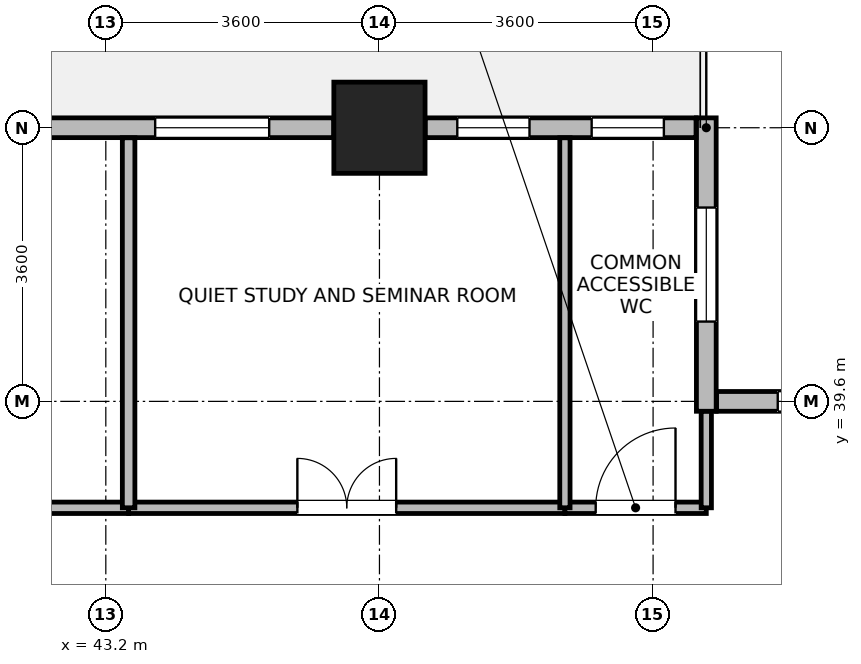
"""IFC4 building model, lengths in metres.
Left out: names, types, materials, properties, quantities, classifications, styles, units other than length and angle.
Written with IfcOpenShell. Run it as: python <this file> out.ifc"""

import sys

from ifc_helpers import new_model, si_unit, direction, frame, frame_2d, origin, origin_2d, place, context, subcontext, project, spatial, rectangle, extrude, source, transform, mapped, element, fill, save


model = new_model("IFC4")
c1 = context("Model", 3, precision=1e-05, world=origin(), true_north=direction((0.0, 1.0)))
c2 = subcontext(c1, "Body", "Model", "MODEL_VIEW")
j1 = project(units=[si_unit("LENGTHUNIT", "METRE"), si_unit("PLANEANGLEUNIT", "RADIAN")], contexts=[c1])
p1 = place(None, origin())
s1 = spatial("IfcSite", under=j1, at=p1, CompositionType="ELEMENT")
p2 = place(p1, origin())
s2 = spatial("IfcBuilding", under=s1, at=p2, CompositionType="ELEMENT")
p3 = place(p2, frame((0.0, 0.0, 108.2)))
s3 = spatial("IfcBuildingStorey", under=s2, at=p3, CompositionType="ELEMENT", Elevation=108.2)
m1 = source(origin(), c2, "Body", "SweptSolid", [
    extrude(rectangle(XDim=1.2, YDim=1.2, at=origin_2d()), origin(), (0.0, 0.0, 1.0), 3.7),
])
p4 = place(p3, frame((46.8, 43.2, 0.0), z_axis=(0.0, 0.0, 1.0), x_axis=(1.0, 0.0, 0.0)))
e1 = element("IfcColumn", 1, at=p4, inside=s3, PredefinedType="COLUMN", context=c2, shape_type="MappedRepresentation", body=[
    mapped(m1, transform((0.0, 0.0, 0.0), x_axis=(1.0, 0.0, 0.0), y_axis=(0.0, 1.0, 0.0), z_axis=(0.0, 0.0, 1.0), scale=1.0)),
])
p5 = place(p3, frame((51.235, 39.6, 0.0), z_axis=(0.0, 0.0, 1.0), x_axis=(1.0, 0.0, 0.0)))
e2 = element("IfcWall", 2, at=p5, inside=s3, PredefinedType="STANDARD", context=c2, shape_type="SweptSolid", body=[
    extrude(rectangle(XDim=9.33, YDim=0.26, at=frame_2d((4.665, 0.0))), origin(), (0.0, 0.0, 1.0), 3.43),
])
p6 = place(p5, frame((0.805, 0.0, 0.85)))
e3 = element("IfcOpeningElement", 3, at=p6, cuts=e2, PredefinedType="OPENING", context=c2, shape_type="SweptSolid", body=[
    extrude(rectangle(XDim=1.5, YDim=1.85, at=frame_2d((0.75, 0.925))), frame((0.0, 0.14, 0.0), z_axis=(0.0, -1.0, 0.0), x_axis=(1.0, 0.0, 0.0)), (0.0, 0.0, 1.0), 0.28),
])
p7 = place(p5, frame((3.915, 0.0, 0.85)))
e4 = element("IfcOpeningElement", 4, at=p7, cuts=e2, PredefinedType="OPENING", context=c2, shape_type="SweptSolid", body=[
    extrude(rectangle(XDim=1.5, YDim=1.85, at=frame_2d((0.75, 0.925))), frame((0.0, 0.14, 0.0), z_axis=(0.0, -1.0, 0.0), x_axis=(1.0, 0.0, 0.0)), (0.0, 0.0, 1.0), 0.28),
])
p8 = place(p5, frame((7.025, 0.0, 0.85)))
e5 = element("IfcOpeningElement", 5, at=p8, cuts=e2, PredefinedType="OPENING", context=c2, shape_type="SweptSolid", body=[
    extrude(rectangle(XDim=1.5, YDim=1.85, at=frame_2d((0.75, 0.925))), frame((0.0, 0.14, 0.0), z_axis=(0.0, -1.0, 0.0), x_axis=(1.0, 0.0, 0.0)), (0.0, 0.0, 1.0), 0.28),
])
p9 = place(p3, frame((51.1, 43.33, 0.0), z_axis=(0.0, 0.0, 1.0), x_axis=(0.0, -1.0, 0.0)))
e6 = element("IfcWall", 6, at=p9, inside=s3, PredefinedType="STANDARD", context=c2, shape_type="SweptSolid", body=[
    extrude(rectangle(XDim=3.86, YDim=0.26, at=frame_2d((1.93, 0.0))), origin(), (0.0, 0.0, 1.0), 3.43),
])
p10 = place(p9, frame((1.18, 0.0, 0.85)))
e7 = element("IfcOpeningElement", 7, at=p10, cuts=e6, PredefinedType="OPENING", context=c2, shape_type="SweptSolid", body=[
    extrude(rectangle(XDim=1.5, YDim=1.85, at=frame_2d((0.75, 0.925))), frame((0.0, 0.14, 0.0), z_axis=(0.0, -1.0, 0.0), x_axis=(1.0, 0.0, 0.0)), (0.0, 0.0, 1.0), 0.28),
])
p11 = place(p3, frame((47.401, 43.2, 0.0), z_axis=(0.0, 0.0, 1.0), x_axis=(1.0, 0.0, 0.0)))
e8 = element("IfcWall", 8, at=p11, inside=s3, PredefinedType="STANDARD", context=c2, shape_type="SweptSolid", body=[
    extrude(rectangle(XDim=3.564, YDim=0.26, at=frame_2d((1.782, 0.0))), origin(), (0.0, 0.0, 1.0), 3.43),
])
p12 = place(p11, frame((0.423, 0.0, 0.85)))
e9 = element("IfcOpeningElement", 9, at=p12, cuts=e8, PredefinedType="OPENING", context=c2, shape_type="SweptSolid", body=[
    extrude(rectangle(XDim=0.95, YDim=1.75, at=frame_2d((0.475, 0.875))), frame((0.0, 0.14, 0.0), z_axis=(0.0, -1.0, 0.0), x_axis=(1.0, 0.0, 0.0)), (0.0, 0.0, 1.0), 0.28),
])
p13 = place(p11, frame((2.191, 0.0, 0.85)))
e10 = element("IfcOpeningElement", 10, at=p13, cuts=e8, PredefinedType="OPENING", context=c2, shape_type="SweptSolid", body=[
    extrude(rectangle(XDim=0.95, YDim=1.75, at=frame_2d((0.475, 0.875))), frame((0.0, 0.14, 0.0), z_axis=(0.0, -1.0, 0.0), x_axis=(1.0, 0.0, 0.0)), (0.0, 0.0, 1.0), 0.28),
])
p14 = place(p3, frame((36.601, 43.2, 0.0), z_axis=(0.0, 0.0, 1.0), x_axis=(1.0, 0.0, 0.0)))
e11 = element("IfcWall", 11, at=p14, inside=s3, PredefinedType="STANDARD", context=c2, shape_type="SweptSolid", body=[
    extrude(rectangle(XDim=9.598, YDim=0.26, at=frame_2d((4.799, 0.0))), origin(), (0.0, 0.0, 1.0), 2.98),
])
p15 = place(p14, frame((4.049, 0.0, 0.0)))
e12 = element("IfcOpeningElement", 12, at=p15, cuts=e11, PredefinedType="OPENING", context=c2, shape_type="SweptSolid", body=[
    extrude(rectangle(XDim=1.5, YDim=2.15, at=frame_2d((0.75, 1.075))), frame((0.0, 0.14, 0.0), z_axis=(0.0, -1.0, 0.0), x_axis=(1.0, 0.0, 0.0)), (0.0, 0.0, 1.0), 0.28),
])
p16 = place(p14, frame((0.85, 0.0, 0.85)))
e13 = element("IfcOpeningElement", 13, at=p16, cuts=e11, PredefinedType="OPENING", context=c2, shape_type="SweptSolid", body=[
    extrude(rectangle(XDim=1.5, YDim=1.85, at=frame_2d((0.75, 0.925))), frame((0.0, 0.14, 0.0), z_axis=(0.0, -1.0, 0.0), x_axis=(1.0, 0.0, 0.0)), (0.0, 0.0, 1.0), 0.28),
])
p17 = place(p14, frame((7.248, 0.0, 0.85)))
e14 = element("IfcOpeningElement", 14, at=p17, cuts=e11, PredefinedType="OPENING", context=c2, shape_type="SweptSolid", body=[
    extrude(rectangle(XDim=1.5, YDim=1.85, at=frame_2d((0.75, 0.925))), frame((0.0, 0.14, 0.0), z_axis=(0.0, -1.0, 0.0), x_axis=(1.0, 0.0, 0.0)), (0.0, 0.0, 1.0), 0.28),
])
p18 = place(p3, frame((34.8, 38.2, 0.0), z_axis=(0.0, 0.0, 1.0), x_axis=(1.0, 0.0, 0.0)))
e15 = element("IfcWall", 15, at=p18, inside=s3, PredefinedType="PARTITIONING", context=c2, shape_type="SweptSolid", body=[
    extrude(rectangle(XDim=8.7, YDim=0.15, at=frame_2d((4.35, 0.0))), origin(), (0.0, 0.0, 1.0), 3.43),
])
p19 = place(p18, frame((3.9, 0.0, 0.0)))
e16 = element("IfcOpeningElement", 16, at=p19, cuts=e15, PredefinedType="OPENING", context=c2, shape_type="SweptSolid", body=[
    extrude(rectangle(XDim=0.9, YDim=2.08, at=frame_2d((0.45, 1.04))), frame((0.0, 0.085, 0.0), z_axis=(0.0, -1.0, 0.0), x_axis=(1.0, 0.0, 0.0)), (0.0, 0.0, 1.0), 0.17),
])
p20 = place(p3, frame((43.5, 38.2, 0.0), z_axis=(0.0, 0.0, 1.0), x_axis=(1.0, 0.0, 0.0)))
e17 = element("IfcWall", 17, at=p20, inside=s3, PredefinedType="PARTITIONING", context=c2, shape_type="SweptSolid", body=[
    extrude(rectangle(XDim=5.74, YDim=0.15, at=frame_2d((2.87, 0.0))), origin(), (0.0, 0.0, 1.0), 3.43),
])
p21 = place(p20, frame((2.22, 0.0, 0.0)))
e18 = element("IfcOpeningElement", 18, at=p21, cuts=e17, PredefinedType="OPENING", context=c2, shape_type="SweptSolid", body=[
    extrude(rectangle(XDim=1.3, YDim=2.12, at=frame_2d((0.65, 1.06))), frame((0.0, 0.085, 0.0), z_axis=(0.0, -1.0, 0.0), x_axis=(1.0, 0.0, 0.0)), (0.0, 0.0, 1.0), 0.17),
])
p22 = place(p3, frame((49.24, 38.2, 0.0), z_axis=(0.0, 0.0, 1.0), x_axis=(1.0, 0.0, 0.0)))
e19 = element("IfcWall", 19, at=p22, inside=s3, PredefinedType="PARTITIONING", context=c2, shape_type="SweptSolid", body=[
    extrude(rectangle(XDim=1.86, YDim=0.15, at=frame_2d((0.93, 0.0))), origin(), (0.0, 0.0, 1.0), 3.43),
])
p23 = place(p22, frame((0.405, 0.0, 0.0)))
e20 = element("IfcOpeningElement", 20, at=p23, cuts=e19, PredefinedType="OPENING", context=c2, shape_type="SweptSolid", body=[
    extrude(rectangle(XDim=1.05, YDim=2.12, at=frame_2d((0.525, 1.06))), frame((0.0, 0.085, 0.0), z_axis=(0.0, -1.0, 0.0), x_axis=(1.0, 0.0, 0.0)), (0.0, 0.0, 1.0), 0.17),
])
p24 = place(p3, frame((43.5, 38.2, 0.0), z_axis=(0.0, 0.0, 1.0), x_axis=(0.0, 1.0, 0.0)))
e21 = element("IfcWall", 21, at=p24, inside=s3, PredefinedType="PARTITIONING", context=c2, shape_type="SweptSolid", body=[
    extrude(rectangle(XDim=4.868, YDim=0.165, at=frame_2d((2.434, 0.0))), origin(), (0.0, 0.0, 1.0), 3.43),
])
p25 = place(p3, frame((49.24, 38.2, 0.0), z_axis=(0.0, 0.0, 1.0), x_axis=(0.0, 1.0, 0.0)))
e22 = element("IfcWall", 22, at=p25, inside=s3, PredefinedType="PARTITIONING", context=c2, shape_type="SweptSolid", body=[
    extrude(rectangle(XDim=4.868, YDim=0.135, at=frame_2d((2.434, 0.0))), origin(), (0.0, 0.0, 1.0), 3.43),
])
p26 = place(p3, frame((51.1, 38.2, 0.0), z_axis=(0.0, 0.0, 1.0), x_axis=(0.0, 1.0, 0.0)))
e23 = element("IfcWall", 23, at=p26, inside=s3, PredefinedType="PARTITIONING", context=c2, shape_type="SweptSolid", body=[
    extrude(rectangle(XDim=1.268, YDim=0.135, at=frame_2d((0.634, 0.0))), origin(), (0.0, 0.0, 1.0), 3.43),
])
p27 = place(p6, origin())
e24 = element("IfcWindow", 24, at=p27, inside=s3, PartitioningType="SINGLE_PANEL", PredefinedType="WINDOW", context=c2, shape_type="SweptSolid", body=[
    extrude(rectangle(XDim=1.5, YDim=1.85, at=frame_2d((0.75, 0.925))), frame((0.0, 0.03, 0.0), z_axis=(0.0, -1.0, 0.0), x_axis=(1.0, 0.0, 0.0)), (0.0, 0.0, 1.0), 0.06),
])
fill(e3, e24)
p28 = place(p10, origin())
e25 = element("IfcWindow", 25, at=p28, inside=s3, PartitioningType="SINGLE_PANEL", PredefinedType="WINDOW", context=c2, shape_type="SweptSolid", body=[
    extrude(rectangle(XDim=1.5, YDim=1.85, at=frame_2d((0.75, 0.925))), frame((0.0, 0.03, 0.0), z_axis=(0.0, -1.0, 0.0), x_axis=(1.0, 0.0, 0.0)), (0.0, 0.0, 1.0), 0.06),
])
fill(e7, e25)
p29 = place(p12, origin())
e26 = element("IfcWindow", 26, at=p29, inside=s3, PartitioningType="SINGLE_PANEL", PredefinedType="WINDOW", context=c2, shape_type="SweptSolid", body=[
    extrude(rectangle(XDim=0.95, YDim=1.75, at=frame_2d((0.475, 0.875))), frame((0.0, 0.03, 0.0), z_axis=(0.0, -1.0, 0.0), x_axis=(1.0, 0.0, 0.0)), (0.0, 0.0, 1.0), 0.06),
])
fill(e9, e26)
p30 = place(p13, origin())
e27 = element("IfcWindow", 27, at=p30, inside=s3, PartitioningType="SINGLE_PANEL", PredefinedType="WINDOW", context=c2, shape_type="SweptSolid", body=[
    extrude(rectangle(XDim=0.95, YDim=1.75, at=frame_2d((0.475, 0.875))), frame((0.0, 0.03, 0.0), z_axis=(0.0, -1.0, 0.0), x_axis=(1.0, 0.0, 0.0)), (0.0, 0.0, 1.0), 0.06),
])
fill(e10, e27)
p31 = place(p17, origin())
e28 = element("IfcWindow", 28, at=p31, inside=s3, PartitioningType="SINGLE_PANEL", PredefinedType="WINDOW", context=c2, shape_type="SweptSolid", body=[
    extrude(rectangle(XDim=1.5, YDim=1.85, at=frame_2d((0.75, 0.925))), frame((0.0, 0.03, 0.0), z_axis=(0.0, -1.0, 0.0), x_axis=(1.0, 0.0, 0.0)), (0.0, 0.0, 1.0), 0.06),
])
fill(e14, e28)
p32 = place(p21, origin())
e29 = element("IfcDoor", 29, at=p32, inside=s3, OperationType="DOUBLE_DOOR_SINGLE_SWING", PredefinedType="DOOR", context=c2, shape_type="SweptSolid", body=[
    extrude(rectangle(XDim=1.3, YDim=2.12, at=frame_2d((0.65, 1.06))), frame((0.0, 0.025, 0.0), z_axis=(0.0, -1.0, 0.0), x_axis=(1.0, 0.0, 0.0)), (0.0, 0.0, 1.0), 0.05),
])
fill(e18, e29)
p33 = place(p23, origin())
e30 = element("IfcDoor", 30, at=p33, inside=s3, OperationType="SINGLE_SWING_RIGHT", PredefinedType="DOOR", context=c2, shape_type="SweptSolid", body=[
    extrude(rectangle(XDim=1.05, YDim=2.12, at=frame_2d((0.525, 1.06))), frame((0.0, 0.025, 0.0), z_axis=(0.0, -1.0, 0.0), x_axis=(1.0, 0.0, 0.0)), (0.0, 0.0, 1.0), 0.05),
])
fill(e20, e30)
save(model, sys.argv[1])
